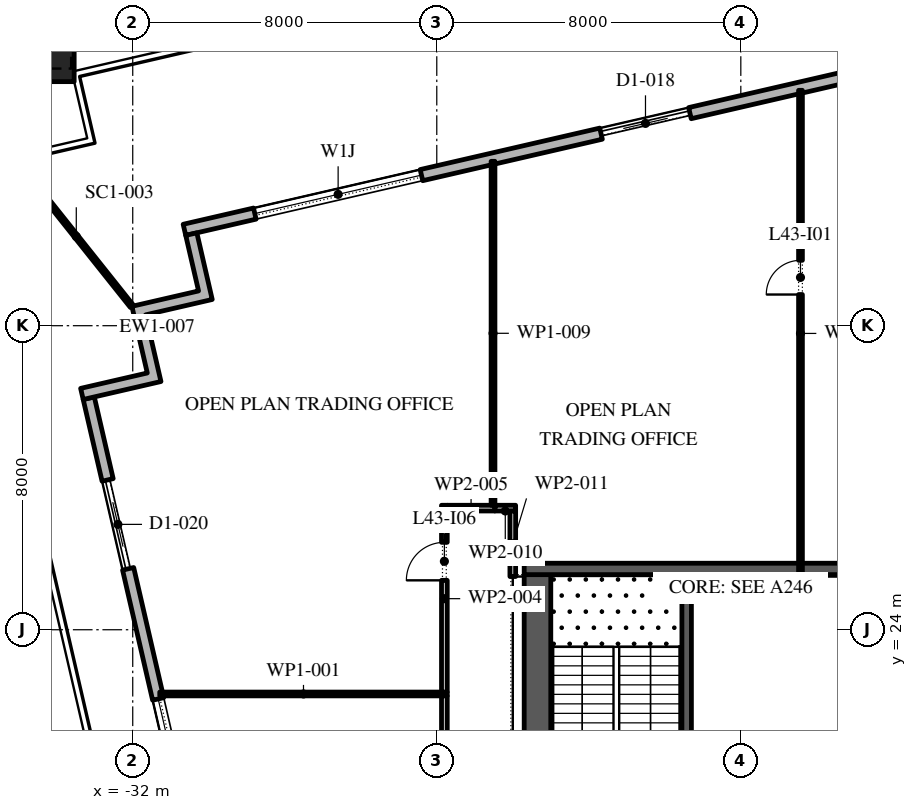
"""IFC4 building model, lengths in metres.
Left out: names, types, materials, properties, quantities, classifications, styles, units other than length and angle.
Written with IfcOpenShell. Run it as: python <this file> out.ifc"""

import sys

from ifc_helpers import new_model, si_unit, direction, frame, frame_2d, origin, origin_2d, place, context, subcontext, project, spatial, polyline, rectangle, outline, extrude, element, fill, save


model = new_model("IFC4")
c1 = context("Model", 3, precision=1e-05, world=origin(), true_north=direction((0.0, 1.0)))
c2 = subcontext(c1, "Body", "Model", "MODEL_VIEW")
j1 = project(units=[si_unit("LENGTHUNIT", "METRE"), si_unit("PLANEANGLEUNIT", "RADIAN")], contexts=[c1])
p1 = place(None, origin())
s1 = spatial("IfcSite", under=j1, at=p1, CompositionType="ELEMENT")
p2 = place(p1, origin())
s2 = spatial("IfcBuilding", under=s1, at=p2, CompositionType="ELEMENT")
p3 = place(p2, frame((0.0, 0.0, 196.8)))
s3 = spatial("IfcBuildingStorey", under=s2, at=p3, CompositionType="ELEMENT", Elevation=196.8)
p4 = place(p3, frame((-34.141, 39.021, 0.0), z_axis=(-0.018825666958, 0.081616506903, 0.99648599592), x_axis=(-0.974414501624, -0.224758490439, 0.0)))
e1 = element("IfcColumn", 1, at=p4, inside=s3, PredefinedType="COLUMN", context=c2, shape_type="SweptSolid", body=[
    extrude(rectangle(XDim=1.2, YDim=1.2, at=origin_2d()), origin(), (0.0, 0.0, 1.0), 4.215),
])
p5 = place(p3, frame((17.592, 45.657, 0.0), z_axis=(0.0, 0.0, 1.0), x_axis=(-0.974370243697, -0.224950279389, 0.0)))
e2 = element("IfcWall", 2, at=p5, inside=s3, PredefinedType="STANDARD", context=c2, shape_type="SweptSolid", body=[
    extrude(rectangle(XDim=49.5, YDim=0.3, at=frame_2d((24.75, 0.0))), origin(), (0.0, 0.0, 1.0), 4.0),
])
p6 = place(p5, frame((2.8, 0.0, 0.0)))
e3 = element("IfcOpeningElement", 3, at=p6, cuts=e2, PredefinedType="OPENING", context=c2, shape_type="SweptSolid", body=[
    extrude(rectangle(XDim=2.4, YDim=3.5, at=frame_2d((1.2, 1.75))), frame((0.0, 0.16, 0.0), z_axis=(0.0, -1.0, 0.0), x_axis=(1.0, 0.0, 0.0)), (0.0, 0.0, 1.0), 0.32),
])
p7 = place(p5, frame((9.9, 0.0, 0.45)))
e4 = element("IfcOpeningElement", 4, at=p7, cuts=e2, PredefinedType="OPENING", context=c2, shape_type="SweptSolid", body=[
    extrude(rectangle(XDim=4.5, YDim=2.45, at=frame_2d((2.25, 1.225))), frame((0.0, 0.16, 0.0), z_axis=(0.0, -1.0, 0.0), x_axis=(1.0, 0.0, 0.0)), (0.0, 0.0, 1.0), 0.32),
])
p8 = place(p5, frame((18.2, 0.0, 0.45)))
e5 = element("IfcOpeningElement", 5, at=p8, cuts=e2, PredefinedType="OPENING", context=c2, shape_type="SweptSolid", body=[
    extrude(rectangle(XDim=4.5, YDim=2.45, at=frame_2d((2.25, 1.225))), frame((0.0, 0.16, 0.0), z_axis=(0.0, -1.0, 0.0), x_axis=(1.0, 0.0, 0.0)), (0.0, 0.0, 1.0), 0.32),
])
p9 = place(p5, frame((26.5, 0.0, 0.45)))
e6 = element("IfcOpeningElement", 6, at=p9, cuts=e2, PredefinedType="OPENING", context=c2, shape_type="SweptSolid", body=[
    extrude(rectangle(XDim=4.5, YDim=2.525, at=frame_2d((2.25, 1.262))), frame((0.0, 0.16, 0.0), z_axis=(0.0, -1.0, 0.0), x_axis=(1.0, 0.0, 0.0)), (0.0, 0.0, 1.0), 0.32),
])
p10 = place(p5, frame((35.85, 0.0, 0.0)))
e7 = element("IfcOpeningElement", 7, at=p10, cuts=e2, PredefinedType="OPENING", context=c2, shape_type="SweptSolid", body=[
    extrude(rectangle(XDim=2.4, YDim=3.5, at=frame_2d((1.2, 1.75))), frame((0.0, 0.16, 0.0), z_axis=(0.0, -1.0, 0.0), x_axis=(1.0, 0.0, 0.0)), (0.0, 0.0, 1.0), 0.32),
])
p11 = place(p5, frame((43.1, 0.0, 0.45)))
e8 = element("IfcOpeningElement", 8, at=p11, cuts=e2, PredefinedType="OPENING", context=c2, shape_type="SweptSolid", body=[
    extrude(rectangle(XDim=4.5, YDim=2.675, at=frame_2d((2.25, 1.337))), frame((0.0, 0.16, 0.0), z_axis=(0.0, -1.0, 0.0), x_axis=(1.0, 0.0, 0.0)), (0.0, 0.0, 1.0), 0.32),
])
p12 = place(p3, frame((-33.157, 30.092, 0.0), z_axis=(0.0, 0.0, 1.0), x_axis=(0.224950279389, -0.974370243697, 0.0)))
e9 = element("IfcWall", 9, at=p12, inside=s3, PredefinedType="STANDARD", context=c2, shape_type="SweptSolid", body=[
    extrude(rectangle(XDim=49.5, YDim=0.3, at=frame_2d((24.75, 0.0))), origin(), (0.0, 0.0, 1.0), 4.0),
])
p13 = place(p12, frame((2.207, 0.0, 0.0)))
e10 = element("IfcOpeningElement", 10, at=p13, cuts=e9, PredefinedType="OPENING", context=c2, shape_type="SweptSolid", body=[
    extrude(rectangle(XDim=2.4, YDim=3.5, at=frame_2d((1.2, 1.75))), frame((0.0, 0.16, 0.0), z_axis=(0.0, -1.0, 0.0), x_axis=(1.0, 0.0, 0.0)), (0.0, 0.0, 1.0), 0.32),
])
p14 = place(p12, frame((8.121, 0.0, 0.45)))
e11 = element("IfcOpeningElement", 11, at=p14, cuts=e9, PredefinedType="OPENING", context=c2, shape_type="SweptSolid", body=[
    extrude(rectangle(XDim=4.5, YDim=2.825, at=frame_2d((2.25, 1.413))), frame((0.0, 0.16, 0.0), z_axis=(0.0, -1.0, 0.0), x_axis=(1.0, 0.0, 0.0)), (0.0, 0.0, 1.0), 0.32),
])
p15 = place(p12, frame((15.236, 0.0, 0.45)))
e12 = element("IfcOpeningElement", 12, at=p15, cuts=e9, PredefinedType="OPENING", context=c2, shape_type="SweptSolid", body=[
    extrude(rectangle(XDim=4.5, YDim=2.95, at=frame_2d((2.25, 1.475))), frame((0.0, 0.16, 0.0), z_axis=(0.0, -1.0, 0.0), x_axis=(1.0, 0.0, 0.0)), (0.0, 0.0, 1.0), 0.32),
])
p16 = place(p12, frame((22.35, 0.0, 0.45)))
e13 = element("IfcOpeningElement", 13, at=p16, cuts=e9, PredefinedType="OPENING", context=c2, shape_type="SweptSolid", body=[
    extrude(rectangle(XDim=4.5, YDim=3.0, at=frame_2d((2.25, 1.5))), frame((0.0, 0.16, 0.0), z_axis=(0.0, -1.0, 0.0), x_axis=(1.0, 0.0, 0.0)), (0.0, 0.0, 1.0), 0.32),
])
p17 = place(p12, frame((30.514, 0.0, 0.0)))
e14 = element("IfcOpeningElement", 14, at=p17, cuts=e9, PredefinedType="OPENING", context=c2, shape_type="SweptSolid", body=[
    extrude(rectangle(XDim=2.4, YDim=3.5, at=frame_2d((1.2, 1.75))), frame((0.0, 0.16, 0.0), z_axis=(0.0, -1.0, 0.0), x_axis=(1.0, 0.0, 0.0)), (0.0, 0.0, 1.0), 0.32),
])
p18 = place(p12, frame((36.579, 0.0, 0.45)))
e15 = element("IfcOpeningElement", 15, at=p18, cuts=e9, PredefinedType="OPENING", context=c2, shape_type="SweptSolid", body=[
    extrude(rectangle(XDim=4.5, YDim=3.05, at=frame_2d((2.25, 1.525))), frame((0.0, 0.16, 0.0), z_axis=(0.0, -1.0, 0.0), x_axis=(1.0, 0.0, 0.0)), (0.0, 0.0, 1.0), 0.32),
])
p19 = place(p12, frame((43.693, 0.0, 0.45)))
e16 = element("IfcOpeningElement", 16, at=p19, cuts=e9, PredefinedType="OPENING", context=c2, shape_type="SweptSolid", body=[
    extrude(rectangle(XDim=4.5, YDim=3.05, at=frame_2d((2.25, 1.525))), frame((0.0, 0.16, 0.0), z_axis=(0.0, -1.0, 0.0), x_axis=(1.0, 0.0, 0.0)), (0.0, 0.0, 1.0), 0.32),
])
p20 = place(p3, origin())
e17 = element("IfcWall", 17, at=p20, inside=s3, PredefinedType="STANDARD", context=c2, shape_type="SweptSolid", body=[
    extrude(outline(polyline([(-31.617, 30.756), (-32.022, 32.51), (-30.268, 32.914), (-30.605, 34.376), (-30.313, 34.443), (-29.908, 32.69), (-31.662, 32.285), (-31.257, 30.531), (-33.303, 30.058), (-33.371, 30.351), (-31.617, 30.756)])), origin(), (0.0, 0.0, 1.0), 4.0),
])
p21 = place(p3, frame((-32.022, 32.51, -0.05), z_axis=(0.0, 0.0, 1.0), x_axis=(-0.623096408526, 0.782145041333, 0.0)))
e18 = element("IfcWall", 18, at=p21, inside=s3, PredefinedType="STANDARD", context=c2, shape_type="SweptSolid", body=[
    extrude(rectangle(XDim=4.697, YDim=0.1, at=frame_2d((2.349, 0.0))), origin(), (0.0, 0.0, 1.0), 4.05),
])
p22 = place(p3, frame((-21.35, -2.45, 0.0), z_axis=(0.0, 0.0, 1.0), x_axis=(0.0, 1.0, 0.0)))
e19 = element("IfcWall", 19, at=p22, inside=s3, PredefinedType="SHEAR", context=c2, shape_type="SweptSolid", body=[
    extrude(rectangle(XDim=27.9, YDim=0.7, at=frame_2d((13.95, 0.0))), origin(), (0.0, 0.0, 1.0), 4.0),
])
p23 = place(p22, frame((5.05, 0.0, 0.0)))
e20 = element("IfcOpeningElement", 20, at=p23, cuts=e19, PredefinedType="OPENING", context=c2, shape_type="SweptSolid", body=[
    extrude(rectangle(XDim=1.2, YDim=2.1, at=frame_2d((0.6, 1.05))), frame((0.0, 0.36, 0.0), z_axis=(0.0, -1.0, 0.0), x_axis=(1.0, 0.0, 0.0)), (0.0, 0.0, 1.0), 0.72),
])
p24 = place(p22, frame((21.65, 0.0, 0.0)))
e21 = element("IfcOpeningElement", 21, at=p24, cuts=e19, PredefinedType="OPENING", context=c2, shape_type="SweptSolid", body=[
    extrude(rectangle(XDim=1.2, YDim=2.1, at=frame_2d((0.6, 1.05))), frame((0.0, 0.36, 0.0), z_axis=(0.0, -1.0, 0.0), x_axis=(1.0, 0.0, 0.0)), (0.0, 0.0, 1.0), 0.72),
])
p25 = place(p3, frame((-21.7, 25.6, 0.0), z_axis=(0.0, 0.0, 1.0), x_axis=(1.0, 0.0, 0.0)))
e22 = element("IfcWall", 22, at=p25, inside=s3, PredefinedType="SHEAR", context=c2, shape_type="SweptSolid", body=[
    extrude(rectangle(XDim=11.4, YDim=0.3, at=frame_2d((5.7, 0.0))), origin(), (0.0, 0.0, 1.0), 4.0),
])
p26 = place(p3, frame((-17.425, 19.15, 0.0), z_axis=(0.0, 0.0, 1.0), x_axis=(0.0, 1.0, 0.0)))
e23 = element("IfcWall", 23, at=p26, inside=s3, PredefinedType="SHEAR", context=c2, shape_type="SweptSolid", body=[
    extrude(rectangle(XDim=6.3, YDim=0.25, at=frame_2d((3.15, 0.0))), origin(), (0.0, 0.0, 1.0), 4.0),
])
p27 = place(p26, frame((0.05, 0.0, 0.0)))
e24 = element("IfcOpeningElement", 24, at=p27, cuts=e23, PredefinedType="OPENING", context=c2, shape_type="SweptSolid", body=[
    extrude(rectangle(XDim=1.2, YDim=2.1, at=frame_2d((0.6, 1.05))), frame((0.0, 0.135, 0.0), z_axis=(0.0, -1.0, 0.0), x_axis=(1.0, 0.0, 0.0)), (0.0, 0.0, 1.0), 0.27),
])
p28 = place(p3, frame((-31.289, 22.31, 0.0), z_axis=(0.0, 0.0, 1.0), x_axis=(1.0, 0.0, 0.0)))
e25 = element("IfcWall", 25, at=p28, inside=s3, PredefinedType="PARTITIONING", context=c2, shape_type="SweptSolid", body=[
    extrude(rectangle(XDim=7.564, YDim=0.1, at=frame_2d((3.782, 0.0))), origin(), (0.0, 0.0, 1.0), 4.0),
])
p29 = place(p3, frame((-23.8, -5.075, 0.0), z_axis=(0.0, 0.0, 1.0), x_axis=(0.0, 1.0, 0.0)))
e26 = element("IfcWall", 26, at=p29, inside=s3, PredefinedType="PARTITIONING", context=c2, shape_type="SweptSolid", body=[
    extrude(rectangle(XDim=27.335, YDim=0.15, at=frame_2d((13.667, 0.0))), origin(), (0.0, 0.0, 1.0), 4.0),
])
p30 = place(p29, frame((15.985, 0.0, 0.0)))
e27 = element("IfcOpeningElement", 27, at=p30, cuts=e26, PredefinedType="OPENING", context=c2, shape_type="SweptSolid", body=[
    extrude(rectangle(XDim=1.0, YDim=2.1, at=frame_2d((0.5, 1.05))), frame((0.0, 0.085, 0.0), z_axis=(0.0, -1.0, 0.0), x_axis=(1.0, 0.0, 0.0)), (0.0, 0.0, 1.0), 0.17),
])
p31 = place(p3, frame((-23.8, 22.36, 0.0), z_axis=(0.0, 0.0, 1.0), x_axis=(0.0, 1.0, 0.0)))
e28 = element("IfcWall", 28, at=p31, inside=s3, PredefinedType="PARTITIONING", context=c2, shape_type="SweptSolid", body=[
    extrude(rectangle(XDim=4.915, YDim=0.15, at=frame_2d((2.458, 0.0))), origin(), (0.0, 0.0, 1.0), 4.0),
])
p32 = place(p31, frame((2.94, 0.0, 0.0)))
e29 = element("IfcOpeningElement", 29, at=p32, cuts=e28, PredefinedType="OPENING", context=c2, shape_type="SweptSolid", body=[
    extrude(rectangle(XDim=1.0, YDim=2.1, at=frame_2d((0.5, 1.05))), frame((0.0, 0.085, 0.0), z_axis=(0.0, -1.0, 0.0), x_axis=(1.0, 0.0, 0.0)), (0.0, 0.0, 1.0), 0.17),
])
p33 = place(p3, frame((-23.725, 27.2, 0.0), z_axis=(0.0, 0.0, 1.0), x_axis=(1.0, 0.0, 0.0)))
e30 = element("IfcWall", 30, at=p33, inside=s3, PredefinedType="PARTITIONING", context=c2, shape_type="SweptSolid", body=[
    extrude(rectangle(XDim=1.255, YDim=0.15, at=frame_2d((0.627, 0.0))), origin(), (0.0, 0.0, 1.0), 4.0),
])
p34 = place(p3, frame((-22.52, 27.275, 0.0), z_axis=(0.0, 0.0, 1.0), x_axis=(0.0, 1.0, 0.0)))
e31 = element("IfcWall", 31, at=p34, inside=s3, PredefinedType="PARTITIONING", context=c2, shape_type="SweptSolid", body=[
    extrude(rectangle(XDim=9.05, YDim=0.1, at=frame_2d((4.525, 0.0))), origin(), (0.0, 0.0, 1.0), 4.0),
])
p35 = place(p3, frame((-22.47, 27.2, 0.0), z_axis=(0.0, 0.0, 1.0), x_axis=(1.0, 0.0, 0.0)))
e32 = element("IfcWall", 32, at=p35, inside=s3, PredefinedType="PARTITIONING", context=c2, shape_type="SweptSolid", body=[
    extrude(rectangle(XDim=0.545, YDim=0.15, at=frame_2d((0.272, 0.0))), origin(), (0.0, 0.0, 1.0), 4.0),
])
p36 = place(p3, frame((-22.0, 27.125, 0.0), z_axis=(0.0, 0.0, 1.0), x_axis=(0.0, -1.0, 0.0)))
e33 = element("IfcWall", 33, at=p36, inside=s3, PredefinedType="PARTITIONING", context=c2, shape_type="SweptSolid", body=[
    extrude(rectangle(XDim=1.725, YDim=0.15, at=frame_2d((0.863, 0.0))), origin(), (0.0, 0.0, 1.0), 4.0),
])
p37 = place(p3, frame((-14.43, 38.193, 0.0), z_axis=(0.0, 0.0, 1.0), x_axis=(0.0, -1.0, 0.0)))
e34 = element("IfcWall", 34, at=p37, inside=s3, PredefinedType="PARTITIONING", context=c2, shape_type="SweptSolid", body=[
    extrude(rectangle(XDim=12.793, YDim=0.1, at=frame_2d((6.396, 0.0))), origin(), (0.0, 0.0, 1.0), 4.0),
])
p38 = place(p37, frame((4.473, 0.0, 0.0)))
e35 = element("IfcOpeningElement", 35, at=p38, cuts=e34, PredefinedType="OPENING", context=c2, shape_type="SweptSolid", body=[
    extrude(rectangle(XDim=0.9, YDim=2.1, at=frame_2d((0.45, 1.05))), frame((0.0, 0.06, 0.0), z_axis=(0.0, -1.0, 0.0), x_axis=(1.0, 0.0, 0.0)), (0.0, 0.0, 1.0), 0.12),
])
p39 = place(p10, origin())
e36 = element("IfcDoor", 36, at=p39, inside=s3, OperationType="DOUBLE_DOOR_SLIDING", PredefinedType="DOOR", context=c2, shape_type="SweptSolid", body=[
    extrude(rectangle(XDim=2.4, YDim=3.5, at=frame_2d((1.2, 1.75))), frame((0.0, 0.025, 0.0), z_axis=(0.0, -1.0, 0.0), x_axis=(1.0, 0.0, 0.0)), (0.0, 0.0, 1.0), 0.05),
])
fill(e7, e36)
p40 = place(p11, origin())
e37 = element("IfcWindow", 37, at=p40, inside=s3, PartitioningType="DOUBLE_PANEL_VERTICAL", PredefinedType="WINDOW", context=c2, shape_type="SweptSolid", body=[
    extrude(rectangle(XDim=4.5, YDim=2.675, at=frame_2d((2.25, 1.337))), frame((0.0, 0.03, 0.0), z_axis=(0.0, -1.0, 0.0), x_axis=(1.0, 0.0, 0.0)), (0.0, 0.0, 1.0), 0.06),
])
fill(e8, e37)
p41 = place(p13, origin())
e38 = element("IfcDoor", 38, at=p41, inside=s3, OperationType="DOUBLE_DOOR_SLIDING", PredefinedType="DOOR", context=c2, shape_type="SweptSolid", body=[
    extrude(rectangle(XDim=2.4, YDim=3.5, at=frame_2d((1.2, 1.75))), frame((0.0, 0.025, 0.0), z_axis=(0.0, -1.0, 0.0), x_axis=(1.0, 0.0, 0.0)), (0.0, 0.0, 1.0), 0.05),
])
fill(e10, e38)
p42 = place(p14, origin())
e39 = element("IfcWindow", 39, at=p42, inside=s3, PartitioningType="DOUBLE_PANEL_VERTICAL", PredefinedType="WINDOW", context=c2, shape_type="SweptSolid", body=[
    extrude(rectangle(XDim=4.5, YDim=2.825, at=frame_2d((2.25, 1.413))), frame((0.0, 0.03, 0.0), z_axis=(0.0, -1.0, 0.0), x_axis=(1.0, 0.0, 0.0)), (0.0, 0.0, 1.0), 0.06),
])
fill(e11, e39)
p43 = place(p38, frame((0.9, 0.0, 0.0), z_axis=(0.0, 0.0, 1.0), x_axis=(-1.0, 0.0, 0.0)))
e40 = element("IfcDoor", 40, at=p43, inside=s3, OperationType="SINGLE_SWING_RIGHT", PredefinedType="DOOR", context=c2, shape_type="SweptSolid", body=[
    extrude(rectangle(XDim=0.9, YDim=2.1, at=frame_2d((0.45, 1.05))), frame((0.0, 0.025, 0.0), z_axis=(0.0, -1.0, 0.0), x_axis=(1.0, 0.0, 0.0)), (0.0, 0.0, 1.0), 0.05),
])
fill(e35, e40)
p44 = place(p32, origin())
e41 = element("IfcDoor", 41, at=p44, inside=s3, OperationType="SINGLE_SWING_RIGHT", PredefinedType="DOOR", context=c2, shape_type="SweptSolid", body=[
    extrude(rectangle(XDim=1.0, YDim=2.1, at=frame_2d((0.5, 1.05))), frame((0.0, 0.025, 0.0), z_axis=(0.0, -1.0, 0.0), x_axis=(1.0, 0.0, 0.0)), (0.0, 0.0, 1.0), 0.05),
])
fill(e29, e41)
save(model, sys.argv[1])
